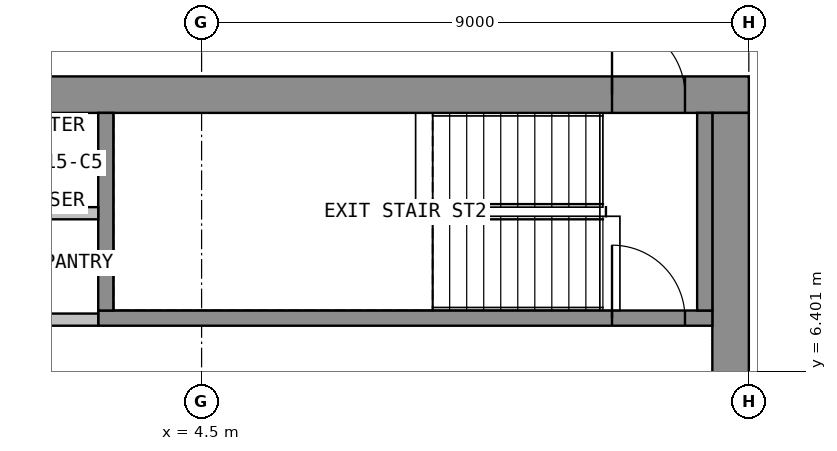
"""IFC4 building model, lengths in metres.
Left out: names, types, materials, properties, quantities, classifications, styles, units other than length and angle.
Written with IfcOpenShell. Run it as: python <this file> out.ifc"""

import sys

from ifc_helpers import new_model, si_unit, direction, frame, frame_2d, origin, place, context, subcontext, project, spatial, rectangle, extrude, element, fill, save


model = new_model("IFC4")
c1 = context("Model", 3, precision=1e-05, world=origin(), true_north=direction((0.0, 1.0)))
c2 = subcontext(c1, "Body", "Model", "MODEL_VIEW")
j1 = project(units=[si_unit("LENGTHUNIT", "METRE"), si_unit("PLANEANGLEUNIT", "RADIAN")], contexts=[c1])
p1 = place(None, origin())
s1 = spatial("IfcSite", under=j1, at=p1, CompositionType="ELEMENT")
p2 = place(p1, origin())
s2 = spatial("IfcBuilding", under=s1, at=p2, CompositionType="ELEMENT")
p3 = place(p2, frame((0.0, 0.0, 207.3)))
s3 = spatial("IfcBuildingStorey", under=s2, at=p3, CompositionType="ELEMENT", Elevation=207.3)
p4 = place(p3, frame((-13.5, 10.95, 0.0), z_axis=(0.0, 0.0, 1.0), x_axis=(1.0, 0.0, 0.0)))
e1 = element("IfcWall", 1, at=p4, inside=s3, PredefinedType="SHEAR", context=c2, shape_type="SweptSolid", body=[
    extrude(rectangle(XDim=27.0, YDim=0.6, at=frame_2d((13.5, 0.0))), origin(), (0.0, 0.0, 1.0), 3.55),
])
p5 = place(p4, frame((12.3, 0.0, 0.0)))
e2 = element("IfcOpeningElement", 2, at=p5, cuts=e1, PredefinedType="OPENING", context=c2, shape_type="SweptSolid", body=[
    extrude(rectangle(XDim=2.4, YDim=2.1, at=frame_2d((1.2, 1.05))), frame((0.0, 0.31, 0.0), z_axis=(0.0, -1.0, 0.0), x_axis=(1.0, 0.0, 0.0)), (0.0, 0.0, 1.0), 0.62),
])
p6 = place(p4, frame((1.05, 0.0, 0.0)))
e3 = element("IfcOpeningElement", 3, at=p6, cuts=e1, PredefinedType="OPENING", context=c2, shape_type="SweptSolid", body=[
    extrude(rectangle(XDim=1.2, YDim=2.1, at=frame_2d((0.6, 1.05))), frame((0.0, 0.31, 0.0), z_axis=(0.0, -1.0, 0.0), x_axis=(1.0, 0.0, 0.0)), (0.0, 0.0, 1.0), 0.62),
])
p7 = place(p4, frame((24.75, 0.0, 0.0)))
e4 = element("IfcOpeningElement", 4, at=p7, cuts=e1, PredefinedType="OPENING", context=c2, shape_type="SweptSolid", body=[
    extrude(rectangle(XDim=1.2, YDim=2.1, at=frame_2d((0.6, 1.05))), frame((0.0, 0.31, 0.0), z_axis=(0.0, -1.0, 0.0), x_axis=(1.0, 0.0, 0.0)), (0.0, 0.0, 1.0), 0.62),
])
p8 = place(p3, frame((13.2, -10.65, 0.0), z_axis=(0.0, 0.0, 1.0), x_axis=(0.0, 1.0, 0.0)))
e5 = element("IfcWall", 5, at=p8, inside=s3, PredefinedType="SHEAR", context=c2, shape_type="SweptSolid", body=[
    extrude(rectangle(XDim=21.3, YDim=0.6, at=frame_2d((10.65, 0.0))), origin(), (0.0, 0.0, 1.0), 3.55),
])
p9 = place(p8, frame((9.45, 0.0, 0.0)))
e6 = element("IfcOpeningElement", 6, at=p9, cuts=e5, PredefinedType="OPENING", context=c2, shape_type="SweptSolid", body=[
    extrude(rectangle(XDim=2.4, YDim=2.1, at=frame_2d((1.2, 1.05))), frame((0.0, 0.31, 0.0), z_axis=(0.0, -1.0, 0.0), x_axis=(1.0, 0.0, 0.0)), (0.0, 0.0, 1.0), 0.62),
])
p10 = place(p3, frame((2.8, 7.275, 0.0), z_axis=(0.0, 0.0, 1.0), x_axis=(1.0, 0.0, 0.0)))
e7 = element("IfcWall", 7, at=p10, inside=s3, PredefinedType="SHEAR", context=c2, shape_type="SweptSolid", body=[
    extrude(rectangle(XDim=10.1, YDim=0.25, at=frame_2d((5.05, 0.0))), origin(), (0.0, 0.0, 1.0), 3.55),
])
p11 = place(p10, frame((8.45, 0.0, 0.0)))
e8 = element("IfcOpeningElement", 8, at=p11, cuts=e7, PredefinedType="OPENING", context=c2, shape_type="SweptSolid", body=[
    extrude(rectangle(XDim=1.2, YDim=2.1, at=frame_2d((0.6, 1.05))), frame((0.0, 0.135, 0.0), z_axis=(0.0, -1.0, 0.0), x_axis=(1.0, 0.0, 0.0)), (0.0, 0.0, 1.0), 0.27),
])
for number, where, z_axis, x_axis in (
    (9, (2.925, 7.4, 0.0), (0.0, 0.0, 1.0), (0.0, 1.0, 0.0)),
    (10, (12.775, 7.4, 0.0), (0.0, 0.0, 1.0), (0.0, 1.0, 0.0)),
):
    element("IfcWall", number, at=place(p3, frame(where, z_axis=z_axis, x_axis=x_axis)), inside=s3, PredefinedType="SHEAR", context=c2, shape_type="SweptSolid", body=[
        extrude(rectangle(XDim=3.25, YDim=0.25, at=frame_2d((1.625, 0.0))), origin(), (0.0, 0.0, 1.0), 3.55),
    ])
for number, where, z_axis, x_axis in (
    (11, (1.4, 7.25, 0.0), (0.0, 0.0, 1.0), (1.0, 0.0, 0.0)),
    (12, (1.4, 9.0, 0.0), (0.0, 0.0, 1.0), (1.0, 0.0, 0.0)),
):
    element("IfcWall", number, at=place(p3, frame(where, z_axis=z_axis, x_axis=x_axis)), inside=s3, PredefinedType="PARTITIONING", context=c2, shape_type="SweptSolid", body=[
        extrude(rectangle(XDim=1.4, YDim=0.2, at=frame_2d((0.7, 0.0))), origin(), (0.0, 0.0, 1.0), 3.55),
    ])
p12 = place(p7, origin())
e13 = element("IfcDoor", 13, at=p12, inside=s3, OperationType="SINGLE_SWING_RIGHT", PredefinedType="DOOR", context=c2, shape_type="SweptSolid", body=[
    extrude(rectangle(XDim=1.2, YDim=2.1, at=frame_2d((0.6, 1.05))), frame((0.0, 0.025, 0.0), z_axis=(0.0, -1.0, 0.0), x_axis=(1.0, 0.0, 0.0)), (0.0, 0.0, 1.0), 0.05),
])
fill(e4, e13)
p13 = place(p11, origin())
e14 = element("IfcDoor", 14, at=p13, inside=s3, OperationType="SINGLE_SWING_LEFT", PredefinedType="DOOR", context=c2, shape_type="SweptSolid", body=[
    extrude(rectangle(XDim=1.2, YDim=2.1, at=frame_2d((0.6, 1.05))), frame((0.0, 0.025, 0.0), z_axis=(0.0, -1.0, 0.0), x_axis=(1.0, 0.0, 0.0)), (0.0, 0.0, 1.0), 0.05),
])
fill(e8, e14)
save(model, sys.argv[1])
